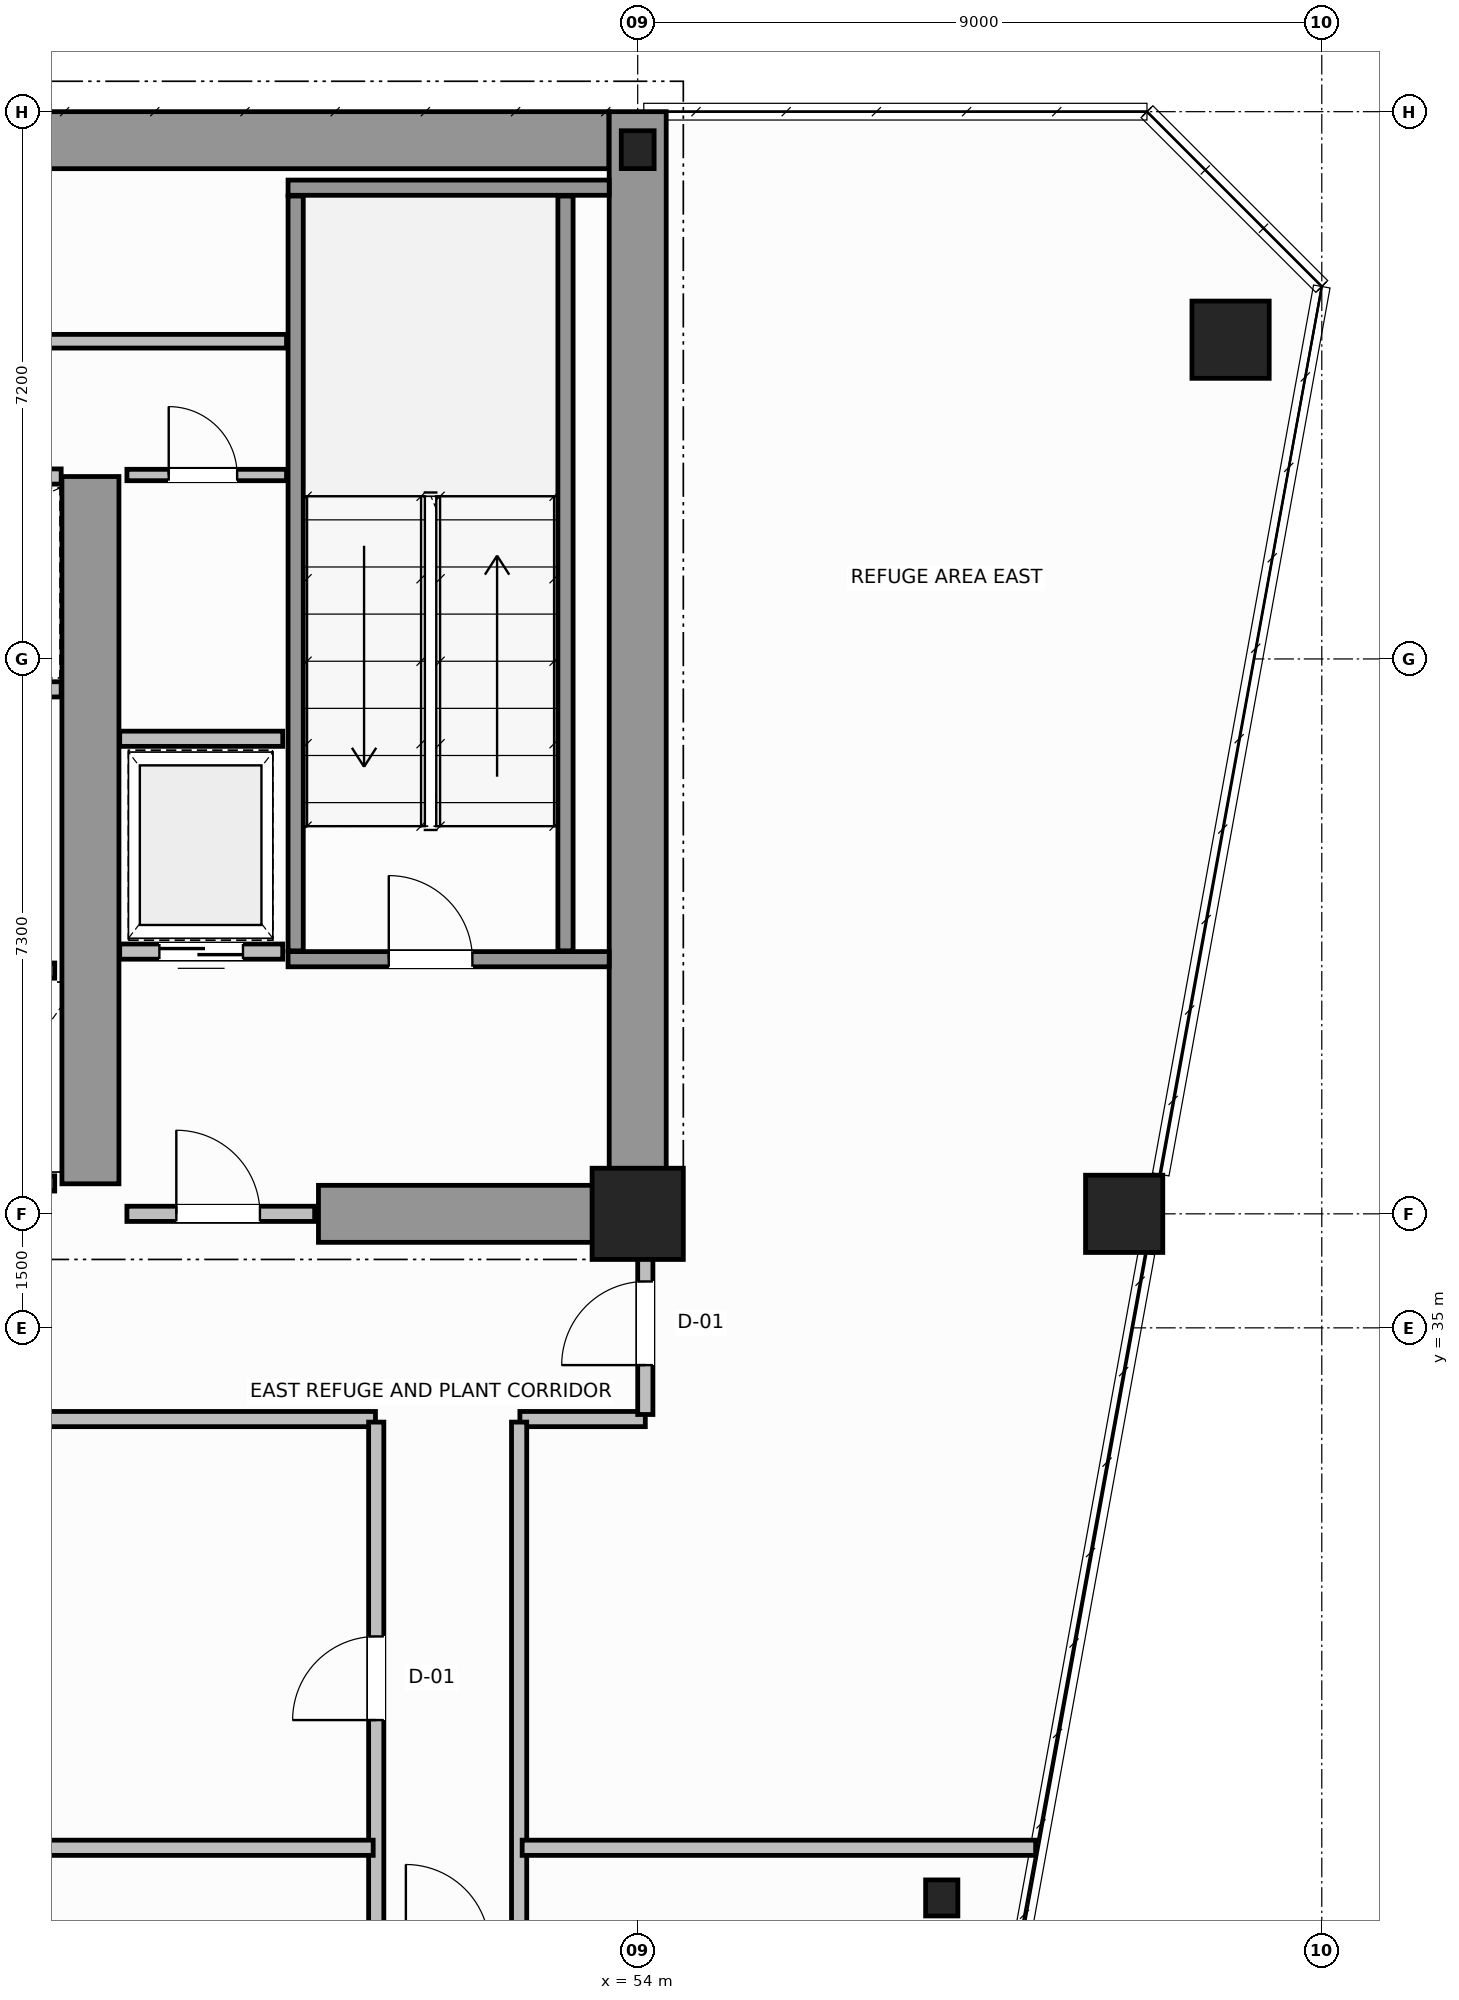
"""IFC4 building model, lengths in metres.
Left out: names, types, materials, properties, quantities, classifications, styles, units other than length and angle.
Written with IfcOpenShell. Run it as: python <this file> out.ifc"""

import sys

from ifc_helpers import new_model, si_unit, direction, frame, frame_2d, origin, origin_2d, place, context, subcontext, project, spatial, rectangle, hollow_circle, i_section, extrude, source, transform, mapped, element, fill, save


model = new_model("IFC4")
c1 = context("Model", 3, precision=1e-05, world=origin(), true_north=direction((0.0, 1.0)))
c2 = subcontext(c1, "Body", "Model", "MODEL_VIEW")
j1 = project(units=[si_unit("LENGTHUNIT", "METRE"), si_unit("PLANEANGLEUNIT", "RADIAN")], contexts=[c1])
p1 = place(None, origin())
s1 = spatial("IfcSite", under=j1, at=p1, CompositionType="ELEMENT")
p2 = place(p1, origin())
s2 = spatial("IfcBuilding", under=s1, at=p2, CompositionType="ELEMENT")
p3 = place(p2, frame((0.0, 0.0, 149.0)))
s3 = spatial("IfcBuildingStorey", under=s2, at=p3, CompositionType="ELEMENT", Elevation=149.0)
m1 = source(origin(), c2, "Body", "SweptSolid", [
    extrude(rectangle(XDim=1.2, YDim=1.2, at=origin_2d()), origin(), (0.0, 0.0, 1.0), 4.8),
])
p4 = place(p3, frame((54.0, 36.5, 0.0), z_axis=(0.0, 0.0, 1.0), x_axis=(1.0, 0.0, 0.0)))
e1 = element("IfcColumn", 1, at=p4, inside=s3, PredefinedType="COLUMN", context=c2, shape_type="MappedRepresentation", body=[
    mapped(m1, transform((0.0, 0.0, 0.0), scale=1.0)),
])
m2 = source(origin(), c2, "Body", "SweptSolid", [
    extrude(i_section(OverallWidth=0.432, OverallDepth=0.498, WebThickness=0.055, FlangeThickness=0.068, FilletRadius=0.015, at=origin_2d()), origin(), (0.0, 0.0, 1.0), 4.8),
])
p5 = place(p3, frame((54.0, 50.5, 0.0), z_axis=(0.0, 0.0, 1.0), x_axis=(1.0, 0.0, 0.0)))
e2 = element("IfcColumn", 2, at=p5, inside=s3, PredefinedType="COLUMN", context=c2, shape_type="MappedRepresentation", body=[
    mapped(m2, transform((0.0, 0.0, 0.0), scale=1.0)),
])
m3 = source(origin(), c2, "Body", "SweptSolid", [
    extrude(hollow_circle(Radius=0.508, WallThickness=0.045, at=origin_2d()), origin(), (0.0, 0.0, 1.0), 4.8),
])
for number, where, z_axis, x_axis in (
    (3, (61.8, 48.0, 0.0), (0.0, 0.0, 1.0), (1.0, 0.0, 0.0)),
    (4, (60.4, 36.5, 0.0), (0.0, 0.0, 1.0), (1.0, 0.0, 0.0)),
):
    element("IfcColumn", number, at=place(p3, frame(where, z_axis=z_axis, x_axis=x_axis)), inside=s3, PredefinedType="COLUMN", context=c2, shape_type="MappedRepresentation", body=[
        mapped(m3, transform((0.0, 0.0, 0.0), scale=1.0)),
    ])
m4 = source(origin(), c2, "Body", "SweptSolid", [
    extrude(i_section(OverallWidth=0.424, OverallDepth=0.474, WebThickness=0.047, FlangeThickness=0.065, FilletRadius=0.015, at=origin_2d()), origin(), (0.0, 0.0, 1.0), 4.8),
])
p6 = place(p3, frame((58.0, 27.5, 0.0), z_axis=(0.0, 0.0, 1.0), x_axis=(1.0, 0.0, 0.0)))
e5 = element("IfcColumn", 5, at=p6, inside=s3, PredefinedType="COLUMN", context=c2, shape_type="MappedRepresentation", body=[
    mapped(m4, transform((0.0, 0.0, 0.0), scale=1.0)),
])
p7 = place(p3, frame((34.002, 50.625, 0.0), z_axis=(0.0, 0.0, 1.0), x_axis=(1.0, 0.0, 0.0)))
e6 = element("IfcWall", 6, at=p7, inside=s3, PredefinedType="SHEAR", context=c2, shape_type="SweptSolid", body=[
    extrude(rectangle(XDim=19.619, YDim=0.75, at=frame_2d((9.81, 0.0))), origin(), (0.0, 0.0, 1.0), 4.8),
])
p8 = place(p3, frame((54.0, 36.5, 0.0), z_axis=(0.0, 0.0, 1.0), x_axis=(0.0, 1.0, 0.0)))
e7 = element("IfcWall", 7, at=p8, inside=s3, PredefinedType="SHEAR", context=c2, shape_type="SweptSolid", body=[
    extrude(rectangle(XDim=14.5, YDim=0.75, at=frame_2d((7.25, 0.0))), origin(), (0.0, 0.0, 1.0), 4.8),
])
p9 = place(p3, frame((49.8, 36.5, 0.0), z_axis=(0.0, 0.0, 1.0), x_axis=(1.0, 0.0, 0.0)))
e8 = element("IfcWall", 8, at=p9, inside=s3, PredefinedType="SHEAR", context=c2, shape_type="SweptSolid", body=[
    extrude(rectangle(XDim=3.805, YDim=0.75, at=frame_2d((1.902, 0.0))), origin(), (0.0, 0.0, 1.0), 3.34),
])
p10 = place(p3, frame((46.8, 36.895, 0.0), z_axis=(0.0, 0.0, 1.0), x_axis=(0.0, 1.0, 0.0)))
e9 = element("IfcWall", 9, at=p10, inside=s3, PredefinedType="SHEAR", context=c2, shape_type="SweptSolid", body=[
    extrude(rectangle(XDim=9.305, YDim=0.75, at=frame_2d((4.652, 0.0))), origin(), (0.0, 0.0, 1.0), 4.8),
])
p11 = place(p3, frame((49.4, 39.85, 0.0), z_axis=(0.0, 0.0, 1.0), x_axis=(1.0, 0.0, 0.0)))
e10 = element("IfcWall", 10, at=p11, inside=s3, PredefinedType="SOLIDWALL", context=c2, shape_type="SweptSolid", body=[
    extrude(rectangle(XDim=4.225, YDim=0.2, at=frame_2d((2.113, 0.0))), origin(), (0.0, 0.0, 1.0), 4.8),
])
p12 = place(p11, frame((1.325, 0.0, 0.0)))
e11 = element("IfcOpeningElement", 11, at=p12, cuts=e10, PredefinedType="OPENING", context=c2, shape_type="SweptSolid", body=[
    extrude(rectangle(XDim=1.1, YDim=2.15, at=frame_2d((0.55, 1.075))), frame((0.0, 0.11, 0.0), z_axis=(0.0, -1.0, 0.0), x_axis=(1.0, 0.0, 0.0)), (0.0, 0.0, 1.0), 0.22),
])
p13 = place(p3, frame((49.4, 50.0, 0.0), z_axis=(0.0, 0.0, 1.0), x_axis=(1.0, 0.0, 0.0)))
e12 = element("IfcWall", 12, at=p13, inside=s3, PredefinedType="SOLIDWALL", context=c2, shape_type="SweptSolid", body=[
    extrude(rectangle(XDim=4.225, YDim=0.2, at=frame_2d((2.113, 0.0))), origin(), (0.0, 0.0, 1.0), 4.8),
])
for number, where, z_axis, x_axis in (
    (13, (49.5, 39.96, 0.0), (0.0, 0.0, 1.0), (0.0, 1.0, 0.0)),
    (14, (53.05, 39.96, 0.0), (0.0, 0.0, 1.0), (0.0, 1.0, 0.0)),
):
    element("IfcWall", number, at=place(p3, frame(where, z_axis=z_axis, x_axis=x_axis)), inside=s3, PredefinedType="SOLIDWALL", context=c2, shape_type="SweptSolid", body=[
        extrude(rectangle(XDim=9.93, YDim=0.2, at=frame_2d((4.965, 0.0))), origin(), (0.0, 0.0, 1.0), 4.8),
    ])
p14 = place(p3, frame((47.28, 36.5, 0.0), z_axis=(0.0, 0.0, 1.0), x_axis=(1.0, 0.0, 0.0)))
e15 = element("IfcWall", 15, at=p14, inside=s3, PredefinedType="SOLIDWALL", context=c2, shape_type="SweptSolid", body=[
    extrude(rectangle(XDim=2.47, YDim=0.2, at=frame_2d((1.235, 0.0))), origin(), (0.0, 0.0, 1.0), 3.33),
])
p15 = place(p14, frame((0.65, 0.0, 0.0)))
e16 = element("IfcOpeningElement", 16, at=p15, cuts=e15, PredefinedType="OPENING", context=c2, shape_type="SweptSolid", body=[
    extrude(rectangle(XDim=1.1, YDim=2.15, at=frame_2d((0.55, 1.075))), frame((0.0, 0.11, 0.0), z_axis=(0.0, -1.0, 0.0), x_axis=(1.0, 0.0, 0.0)), (0.0, 0.0, 1.0), 0.22),
])
p16 = place(p3, frame((44.37, 39.7, 0.0), z_axis=(0.0, 0.0, 1.0), x_axis=(1.0, 0.0, 0.0)))
e17 = element("IfcWall", 17, at=p16, inside=s3, PredefinedType="SOLIDWALL", context=c2, shape_type="SweptSolid", body=[
    extrude(rectangle(XDim=1.96, YDim=0.2, at=frame_2d((0.98, 0.0))), origin(), (0.0, 0.0, 1.0), 4.54),
])
p17 = place(p3, frame((44.37, 36.9, 0.0), z_axis=(0.0, 0.0, 1.0), x_axis=(1.0, 0.0, 0.0)))
e18 = element("IfcWall", 18, at=p17, inside=s3, PredefinedType="SOLIDWALL", context=c2, shape_type="SweptSolid", body=[
    extrude(rectangle(XDim=1.96, YDim=0.2, at=frame_2d((0.98, 0.0))), origin(), (0.0, 0.0, 1.0), 3.33),
])
for number, where, z_axis, x_axis in (
    (19, (44.62, 43.4, 0.0), (0.0, 0.0, 1.0), (1.0, 0.0, 0.0)),
    (20, (44.62, 46.2, 0.0), (0.0, 0.0, 1.0), (1.0, 0.0, 0.0)),
):
    element("IfcWall", number, at=place(p3, frame(where, z_axis=z_axis, x_axis=x_axis)), inside=s3, PredefinedType="SOLIDWALL", context=c2, shape_type="SweptSolid", body=[
        extrude(rectangle(XDim=1.795, YDim=0.2, at=frame_2d((0.897, 0.0))), origin(), (0.0, 0.0, 1.0), 4.54),
    ])
p18 = place(p3, frame((47.185, 39.95, 0.0), z_axis=(0.0, 0.0, 1.0), x_axis=(1.0, 0.0, 0.0)))
e21 = element("IfcWall", 21, at=p18, inside=s3, PredefinedType="SOLIDWALL", context=c2, shape_type="SweptSolid", body=[
    extrude(rectangle(XDim=2.145, YDim=0.2, at=frame_2d((1.073, 0.0))), origin(), (0.0, 0.0, 1.0), 4.54),
])
p19 = place(p18, frame((0.522, 0.0, 0.0)))
e22 = element("IfcOpeningElement", 22, at=p19, cuts=e21, PredefinedType="OPENING", context=c2, shape_type="SweptSolid", body=[
    extrude(rectangle(XDim=1.1, YDim=2.15, at=frame_2d((0.55, 1.075))), frame((0.0, 0.11, 0.0), z_axis=(0.0, -1.0, 0.0), x_axis=(1.0, 0.0, 0.0)), (0.0, 0.0, 1.0), 0.22),
])
p20 = place(p3, frame((47.185, 42.75, 0.0), z_axis=(0.0, 0.0, 1.0), x_axis=(1.0, 0.0, 0.0)))
e23 = element("IfcWall", 23, at=p20, inside=s3, PredefinedType="SOLIDWALL", context=c2, shape_type="SweptSolid", body=[
    extrude(rectangle(XDim=2.145, YDim=0.2, at=frame_2d((1.073, 0.0))), origin(), (0.0, 0.0, 1.0), 4.54),
])
p21 = place(p3, frame((47.28, 46.22, 0.0), z_axis=(0.0, 0.0, 1.0), x_axis=(1.0, 0.0, 0.0)))
e24 = element("IfcWall", 24, at=p21, inside=s3, PredefinedType="PARTITIONING", context=c2, shape_type="SweptSolid", body=[
    extrude(rectangle(XDim=2.1, YDim=0.15, at=frame_2d((1.05, 0.0))), origin(), (0.0, 0.0, 1.0), 4.54),
])
p22 = place(p21, frame((0.55, 0.0, 0.0)))
e25 = element("IfcOpeningElement", 25, at=p22, cuts=e24, PredefinedType="OPENING", context=c2, shape_type="SweptSolid", body=[
    extrude(rectangle(XDim=0.9, YDim=2.1, at=frame_2d((0.45, 1.05))), frame((0.0, 0.085, 0.0), z_axis=(0.0, -1.0, 0.0), x_axis=(1.0, 0.0, 0.0)), (0.0, 0.0, 1.0), 0.17),
])
p23 = place(p3, frame((40.62, 47.98, 0.0), z_axis=(0.0, 0.0, 1.0), x_axis=(1.0, 0.0, 0.0)))
e26 = element("IfcWall", 26, at=p23, inside=s3, PredefinedType="PLUMBINGWALL", context=c2, shape_type="SweptSolid", body=[
    extrude(rectangle(XDim=8.76, YDim=0.18, at=frame_2d((4.38, 0.0))), origin(), (0.0, 0.0, 1.0), 4.54),
])
p24 = place(p23, frame((3.8, 0.0, 0.0)))
e27 = element("IfcOpeningElement", 27, at=p24, cuts=e26, PredefinedType="OPENING", context=c2, shape_type="SweptSolid", body=[
    extrude(rectangle(XDim=0.9, YDim=2.15, at=frame_2d((0.45, 1.075))), frame((0.0, 0.1, 0.0), z_axis=(0.0, -1.0, 0.0), x_axis=(1.0, 0.0, 0.0)), (0.0, 0.0, 1.0), 0.2),
])
p25 = place(p3, frame((39.64, 33.8, 0.0), z_axis=(0.0, 0.0, 1.0), x_axis=(1.0, 0.0, 0.0)))
e28 = element("IfcWall", 28, at=p25, inside=s3, PredefinedType="SOLIDWALL", context=c2, shape_type="SweptSolid", body=[
    extrude(rectangle(XDim=10.91, YDim=0.2, at=frame_2d((5.455, 0.0))), origin(), (0.0, 0.0, 1.0), 4.54),
])
p26 = place(p25, frame((1.8, 0.0, 0.0)))
e29 = element("IfcOpeningElement", 29, at=p26, cuts=e28, PredefinedType="OPENING", context=c2, shape_type="SweptSolid", body=[
    extrude(rectangle(XDim=1.1, YDim=2.15, at=frame_2d((0.55, 1.075))), frame((0.0, 0.11, 0.0), z_axis=(0.0, -1.0, 0.0), x_axis=(1.0, 0.0, 0.0)), (0.0, 0.0, 1.0), 0.22),
])
p27 = place(p3, frame((52.45, 33.8, 0.0), z_axis=(0.0, 0.0, 1.0), x_axis=(1.0, 0.0, 0.0)))
e30 = element("IfcWall", 30, at=p27, inside=s3, PredefinedType="SOLIDWALL", context=c2, shape_type="SweptSolid", body=[
    extrude(rectangle(XDim=1.65, YDim=0.2, at=frame_2d((0.825, 0.0))), origin(), (0.0, 0.0, 1.0), 4.54),
])
p28 = place(p3, frame((54.1, 33.86, 0.0), z_axis=(0.0, 0.0, 1.0), x_axis=(0.0, 1.0, 0.0)))
e31 = element("IfcWall", 31, at=p28, inside=s3, PredefinedType="SOLIDWALL", context=c2, shape_type="SweptSolid", body=[
    extrude(rectangle(XDim=2.58, YDim=0.2, at=frame_2d((1.29, 0.0))), origin(), (0.0, 0.0, 1.0), 4.54),
])
p29 = place(p28, frame((0.65, 0.0, 0.0)))
e32 = element("IfcOpeningElement", 32, at=p29, cuts=e31, PredefinedType="OPENING", context=c2, shape_type="SweptSolid", body=[
    extrude(rectangle(XDim=1.1, YDim=2.15, at=frame_2d((0.55, 1.075))), frame((0.0, 0.11, 0.0), z_axis=(0.0, -1.0, 0.0), x_axis=(1.0, 0.0, 0.0)), (0.0, 0.0, 1.0), 0.22),
])
p30 = place(p3, frame((50.56, 26.84, 0.0), z_axis=(0.0, 0.0, 1.0), x_axis=(0.0, 1.0, 0.0)))
e33 = element("IfcWall", 33, at=p30, inside=s3, PredefinedType="SOLIDWALL", context=c2, shape_type="SweptSolid", body=[
    extrude(rectangle(XDim=6.92, YDim=0.2, at=frame_2d((3.46, 0.0))), origin(), (0.0, 0.0, 1.0), 4.54),
])
p31 = place(p30, frame((3.0, 0.0, 0.0)))
e34 = element("IfcOpeningElement", 34, at=p31, cuts=e33, PredefinedType="OPENING", context=c2, shape_type="SweptSolid", body=[
    extrude(rectangle(XDim=1.1, YDim=2.15, at=frame_2d((0.55, 1.075))), frame((0.0, 0.11, 0.0), z_axis=(0.0, -1.0, 0.0), x_axis=(1.0, 0.0, 0.0)), (0.0, 0.0, 1.0), 0.22),
])
p32 = place(p3, frame((52.44, 26.84, 0.0), z_axis=(0.0, 0.0, 1.0), x_axis=(0.0, 1.0, 0.0)))
e35 = element("IfcWall", 35, at=p32, inside=s3, PredefinedType="SOLIDWALL", context=c2, shape_type="SweptSolid", body=[
    extrude(rectangle(XDim=6.92, YDim=0.2, at=frame_2d((3.46, 0.0))), origin(), (0.0, 0.0, 1.0), 4.54),
])
p33 = place(p3, frame((17.48, 28.16, 0.0), z_axis=(0.0, 0.0, 1.0), x_axis=(1.0, 0.0, 0.0)))
e36 = element("IfcWall", 36, at=p33, inside=s3, PredefinedType="SOLIDWALL", context=c2, shape_type="SweptSolid", body=[
    extrude(rectangle(XDim=33.04, YDim=0.2, at=frame_2d((16.52, 0.0))), origin(), (0.0, 0.0, 1.0), 4.54),
])
p34 = place(p3, frame((52.48, 28.16, 0.0), z_axis=(0.0, 0.0, 1.0), x_axis=(1.0, 0.0, 0.0)))
e37 = element("IfcWall", 37, at=p34, inside=s3, PredefinedType="SOLIDWALL", context=c2, shape_type="SweptSolid", body=[
    extrude(rectangle(XDim=6.755, YDim=0.2, at=frame_2d((3.377, 0.0))), origin(), (0.0, 0.0, 1.0), 4.54),
])
m5 = source(origin(), c2, "Body", "SweptSolid", [
    extrude(rectangle(XDim=1.1, YDim=2.15, at=frame_2d((0.55, 1.075))), frame((0.0, 0.025, 0.0), z_axis=(0.0, -1.0, 0.0), x_axis=(1.0, 0.0, 0.0)), (0.0, 0.0, 1.0), 0.05),
])
p35 = place(p12, origin())
e38 = element("IfcDoor", 38, at=p35, inside=s3, OperationType="SINGLE_SWING_RIGHT", PredefinedType="DOOR", context=c2, shape_type="MappedRepresentation", body=[
    mapped(m5, transform((0.0, 0.0, 0.0), scale=1.0)),
])
fill(e11, e38)
p36 = place(p15, origin())
e39 = element("IfcDoor", 39, at=p36, inside=s3, OperationType="SINGLE_SWING_LEFT", PredefinedType="DOOR", context=c2, shape_type="MappedRepresentation", body=[
    mapped(m5, transform((0.0, 0.0, 0.0), scale=1.0)),
])
fill(e16, e39)
p37 = place(p19, origin())
e40 = element("IfcDoor", 40, at=p37, inside=s3, OperationType="DOUBLE_DOOR_SLIDING", PredefinedType="DOOR", context=c2, shape_type="MappedRepresentation", body=[
    mapped(m5, transform((0.0, 0.0, 0.0), scale=1.0)),
])
fill(e22, e40)
m6 = source(origin(), c2, "Body", "SweptSolid", [
    extrude(rectangle(XDim=0.9, YDim=2.1, at=frame_2d((0.45, 1.05))), frame((0.0, 0.025, 0.0), z_axis=(0.0, -1.0, 0.0), x_axis=(1.0, 0.0, 0.0)), (0.0, 0.0, 1.0), 0.05),
])
p38 = place(p22, origin())
e41 = element("IfcDoor", 41, at=p38, inside=s3, OperationType="SINGLE_SWING_RIGHT", PredefinedType="DOOR", context=c2, shape_type="MappedRepresentation", body=[
    mapped(m6, transform((0.0, 0.0, 0.0), scale=1.0)),
])
fill(e25, e41)
p39 = place(p29, origin())
e42 = element("IfcDoor", 42, at=p39, inside=s3, OperationType="SINGLE_SWING_RIGHT", PredefinedType="DOOR", context=c2, shape_type="MappedRepresentation", body=[
    mapped(m5, transform((0.0, 0.0, 0.0), scale=1.0)),
])
fill(e32, e42)
p40 = place(p31, origin())
e43 = element("IfcDoor", 43, at=p40, inside=s3, OperationType="SINGLE_SWING_LEFT", PredefinedType="DOOR", context=c2, shape_type="MappedRepresentation", body=[
    mapped(m5, transform((0.0, 0.0, 0.0), scale=1.0)),
])
fill(e34, e43)
save(model, sys.argv[1])
